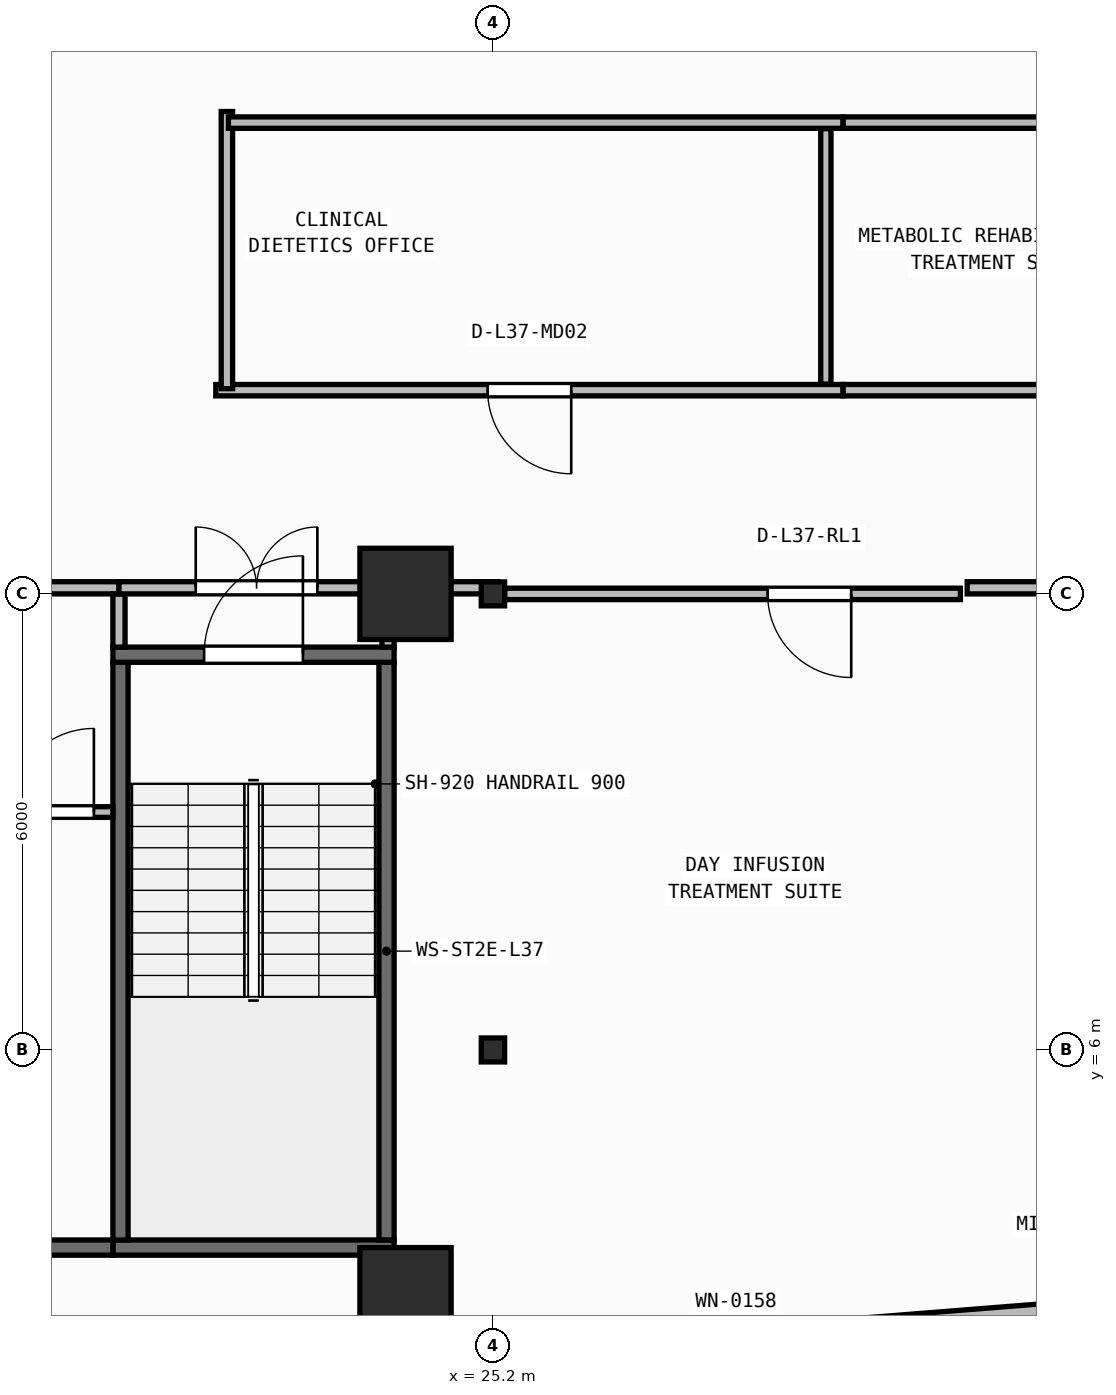
"""IFC4 building model, lengths in metres.
Left out: names, types, materials, properties, quantities, classifications, styles, units other than length and angle.
Written with IfcOpenShell. Run it as: python <this file> out.ifc"""

import sys

from ifc_helpers import new_model, si_unit, direction, frame, frame_2d, origin, origin_2d, place, context, subcontext, project, spatial, rectangle, i_section, extrude, element, fill, save


model = new_model("IFC4")
c1 = context("Model", 3, precision=1e-05, world=origin(), true_north=direction((0.0, 1.0)))
c2 = subcontext(c1, "Body", "Model", "MODEL_VIEW")
j1 = project(units=[si_unit("LENGTHUNIT", "METRE"), si_unit("PLANEANGLEUNIT", "RADIAN")], contexts=[c1])
p1 = place(None, origin())
s1 = spatial("IfcSite", under=j1, at=p1, CompositionType="ELEMENT")
p2 = place(p1, origin())
s2 = spatial("IfcBuilding", under=s1, at=p2, CompositionType="ELEMENT")
p3 = place(p2, frame((0.0, 0.0, 150.75)))
s3 = spatial("IfcBuildingStorey", under=s2, at=p3, CompositionType="ELEMENT", Elevation=150.75)
p4 = place(p3, frame((24.05, 2.8, 0.0), z_axis=(0.0, 0.0, 1.0), x_axis=(1.0, 0.0, 0.0)))
e1 = element("IfcColumn", 1, at=p4, inside=s3, PredefinedType="COLUMN", context=c2, shape_type="SweptSolid", body=[
    extrude(rectangle(XDim=1.2, YDim=1.2, at=origin_2d()), origin(), (0.0, 0.0, 1.0), 3.95),
])
p5 = place(p3, frame((25.2, 6.0, 0.0), z_axis=(0.0, 0.0, 1.0), x_axis=(1.0, 0.0, 0.0)))
e2 = element("IfcColumn", 2, at=p5, inside=s3, PredefinedType="COLUMN", context=c2, shape_type="SweptSolid", body=[
    extrude(i_section(OverallWidth=0.307, OverallDepth=0.315, WebThickness=0.012, FlangeThickness=0.019, FilletRadius=0.017, at=origin_2d()), origin(), (0.0, 0.0, 1.0), 3.95),
])
p6 = place(p3, frame((24.05, 12.0, 0.0), z_axis=(0.0, 0.0, 1.0), x_axis=(1.0, 0.0, 0.0)))
e3 = element("IfcColumn", 3, at=p6, inside=s3, PredefinedType="COLUMN", context=c2, shape_type="SweptSolid", body=[
    extrude(rectangle(XDim=1.2, YDim=1.2, at=origin_2d()), origin(), (0.0, 0.0, 1.0), 3.95),
])
p7 = place(p3, frame((25.2, 12.0, 0.0), z_axis=(0.0, 0.0, 1.0), x_axis=(1.0, 0.0, 0.0)))
e4 = element("IfcColumn", 4, at=p7, inside=s3, PredefinedType="COLUMN", context=c2, shape_type="SweptSolid", body=[
    extrude(i_section(OverallWidth=0.307, OverallDepth=0.315, WebThickness=0.012, FlangeThickness=0.019, FilletRadius=0.017, at=origin_2d()), origin(), (0.0, 0.0, 1.0), 3.95),
])
p8 = place(p3, frame((2.76, 0.173, 0.0), z_axis=(0.0, 0.0, 1.0), x_axis=(0.996857931723, 0.079210251617, 0.0)))
e5 = element("IfcWall", 5, at=p8, inside=s3, PredefinedType="STANDARD", context=c2, shape_type="SweptSolid", body=[
    extrude(rectangle(XDim=51.442, YDim=0.26, at=frame_2d((25.721, 0.0))), origin(), (0.0, 0.0, 1.0), 3.71),
])
p9 = place(p8, frame((24.521, 0.0, 0.9)))
e6 = element("IfcOpeningElement", 6, at=p9, cuts=e5, PredefinedType="OPENING", context=c2, shape_type="SweptSolid", body=[
    extrude(rectangle(XDim=2.4, YDim=1.65, at=frame_2d((1.2, 0.825))), frame((0.0, 0.14, 0.0), z_axis=(0.0, -1.0, 0.0), x_axis=(1.0, 0.0, 0.0)), (0.0, 0.0, 1.0), 0.28),
])
p10 = place(p3, frame((20.2, 3.4, 0.0), z_axis=(0.0, 0.0, 1.0), x_axis=(1.0, 0.0, 0.0)))
e7 = element("IfcWall", 7, at=p10, inside=s3, PredefinedType="SHEAR", context=c2, shape_type="SweptSolid", body=[
    extrude(rectangle(XDim=3.7, YDim=0.2, at=frame_2d((1.85, 0.0))), origin(), (0.0, 0.0, 1.0), 3.71),
])
for number, where, z_axis, x_axis in (
    (8, (20.3, 3.5, 0.0), (0.0, 0.0, 1.0), (0.0, 1.0, 0.0)),
    (9, (23.8, 3.5, 0.0), (0.0, 0.0, 1.0), (0.0, 1.0, 0.0)),
):
    element("IfcWall", number, at=place(p3, frame(where, z_axis=z_axis, x_axis=x_axis)), inside=s3, PredefinedType="SHEAR", context=c2, shape_type="SweptSolid", body=[
        extrude(rectangle(XDim=7.6, YDim=0.2, at=frame_2d((3.8, 0.0))), origin(), (0.0, 0.0, 1.0), 3.71),
    ])
p11 = place(p3, frame((20.2, 11.2, 0.0), z_axis=(0.0, 0.0, 1.0), x_axis=(1.0, 0.0, 0.0)))
e10 = element("IfcWall", 10, at=p11, inside=s3, PredefinedType="SHEAR", context=c2, shape_type="SweptSolid", body=[
    extrude(rectangle(XDim=3.7, YDim=0.2, at=frame_2d((1.85, 0.0))), origin(), (0.0, 0.0, 1.0), 3.71),
])
p12 = place(p11, frame((1.2, 0.0, 0.0)))
e11 = element("IfcOpeningElement", 11, at=p12, cuts=e10, PredefinedType="OPENING", context=c2, shape_type="SweptSolid", body=[
    extrude(rectangle(XDim=1.3, YDim=2.15, at=frame_2d((0.65, 1.075))), frame((0.0, 0.11, 0.0), z_axis=(0.0, -1.0, 0.0), x_axis=(1.0, 0.0, 0.0)), (0.0, 0.0, 1.0), 0.22),
])
p13 = place(p3, frame((6.5, 3.4, 0.0), z_axis=(0.0, 0.0, 1.0), x_axis=(1.0, 0.0, 0.0)))
e12 = element("IfcWall", 12, at=p13, inside=s3, PredefinedType="SHEAR", context=c2, shape_type="SweptSolid", body=[
    extrude(rectangle(XDim=13.7, YDim=0.2, at=frame_2d((6.85, 0.0))), origin(), (0.0, 0.0, 1.0), 3.71),
])
p14 = place(p3, frame((18.61, 9.13, 0.0), z_axis=(0.0, 0.0, 1.0), x_axis=(1.0, 0.0, 0.0)))
e13 = element("IfcWall", 13, at=p14, inside=s3, PredefinedType="PARTITIONING", context=c2, shape_type="SweptSolid", body=[
    extrude(rectangle(XDim=1.59, YDim=0.14, at=frame_2d((0.795, 0.0))), origin(), (0.0, 0.0, 1.0), 3.71),
])
p15 = place(p14, frame((0.24, 0.0, 0.0)))
e14 = element("IfcOpeningElement", 14, at=p15, cuts=e13, PredefinedType="OPENING", context=c2, shape_type="SweptSolid", body=[
    extrude(rectangle(XDim=1.1, YDim=2.1, at=frame_2d((0.55, 1.05))), frame((0.0, 0.08, 0.0), z_axis=(0.0, -1.0, 0.0), x_axis=(1.0, 0.0, 0.0)), (0.0, 0.0, 1.0), 0.16),
])
p16 = place(p3, frame((12.58, 12.08, 0.0), z_axis=(0.0, 0.0, 1.0), x_axis=(1.0, 0.0, 0.0)))
e15 = element("IfcWall", 15, at=p16, inside=s3, PredefinedType="PARTITIONING", context=c2, shape_type="SweptSolid", body=[
    extrude(rectangle(XDim=7.7, YDim=0.16, at=frame_2d((3.85, 0.0))), origin(), (0.0, 0.0, 1.0), 3.083),
])
p17 = place(p16, frame((3.05, 0.0, 0.0)))
e16 = element("IfcOpeningElement", 16, at=p17, cuts=e15, PredefinedType="OPENING", context=c2, shape_type="SweptSolid", body=[
    extrude(rectangle(XDim=1.6, YDim=2.05, at=frame_2d((0.8, 1.025))), frame((0.0, 0.09, 0.0), z_axis=(0.0, -1.0, 0.0), x_axis=(1.0, 0.0, 0.0)), (0.0, 0.0, 1.0), 0.18),
])
p18 = place(p3, frame((20.28, 11.3, 0.0), z_axis=(0.0, 0.0, 1.0), x_axis=(0.0, 1.0, 0.0)))
e17 = element("IfcWall", 17, at=p18, inside=s3, PredefinedType="PARTITIONING", context=c2, shape_type="SweptSolid", body=[
    extrude(rectangle(XDim=0.7, YDim=0.16, at=frame_2d((0.35, 0.0))), origin(), (0.0, 0.0, 1.0), 3.71),
])
p19 = place(p3, frame((20.28, 12.08, 0.0), z_axis=(0.0, 0.0, 1.0), x_axis=(1.0, 0.0, 0.0)))
e18 = element("IfcWall", 18, at=p19, inside=s3, PredefinedType="PARTITIONING", context=c2, shape_type="SweptSolid", body=[
    extrude(rectangle(XDim=3.62, YDim=0.16, at=frame_2d((1.81, 0.0))), origin(), (0.0, 0.0, 1.0), 3.083),
])
p20 = place(p19, frame((1.01, 0.0, 0.0)))
e19 = element("IfcOpeningElement", 19, at=p20, cuts=e18, PredefinedType="OPENING", context=c2, shape_type="SweptSolid", body=[
    extrude(rectangle(XDim=1.6, YDim=2.05, at=frame_2d((0.8, 1.025))), frame((0.0, 0.09, 0.0), z_axis=(0.0, -1.0, 0.0), x_axis=(1.0, 0.0, 0.0)), (0.0, 0.0, 1.0), 0.18),
])
p21 = place(p3, frame((23.82, 11.3, 0.0), z_axis=(0.0, 0.0, 1.0), x_axis=(0.0, 1.0, 0.0)))
e20 = element("IfcWall", 20, at=p21, inside=s3, PredefinedType="PARTITIONING", context=c2, shape_type="SweptSolid", body=[
    extrude(rectangle(XDim=0.7, YDim=0.16, at=frame_2d((0.35, 0.0))), origin(), (0.0, 0.0, 1.0), 3.71),
])
p22 = place(p3, frame((31.35, 12.0, 0.0), z_axis=(0.0, 0.0, 1.0), x_axis=(-1.0, 0.0, 0.0)))
e21 = element("IfcWall", 21, at=p22, inside=s3, PredefinedType="PARTITIONING", context=c2, shape_type="SweptSolid", body=[
    extrude(rectangle(XDim=5.997, YDim=0.15, at=frame_2d((2.998, 0.0))), origin(), (0.0, 0.0, 1.0), 3.083),
])
p23 = place(p22, frame((1.437, 0.0, 0.0)))
e22 = element("IfcOpeningElement", 22, at=p23, cuts=e21, PredefinedType="OPENING", context=c2, shape_type="SweptSolid", body=[
    extrude(rectangle(XDim=1.1, YDim=2.1, at=frame_2d((0.55, 1.05))), frame((0.0, 0.085, 0.0), z_axis=(0.0, -1.0, 0.0), x_axis=(1.0, 0.0, 0.0)), (0.0, 0.0, 1.0), 0.17),
])
p24 = place(p3, frame((29.806, 14.68, 0.0), z_axis=(0.0, 0.0, 1.0), x_axis=(-1.0, 0.0, 0.0)))
e23 = element("IfcWall", 23, at=p24, inside=s3, PredefinedType="PARTITIONING", context=c2, shape_type="SweptSolid", body=[
    extrude(rectangle(XDim=8.252, YDim=0.15, at=frame_2d((4.126, 0.0))), origin(), (0.0, 0.0, 1.0), 3.71),
])
p25 = place(p24, frame((3.576, 0.0, 0.0)))
e24 = element("IfcOpeningElement", 24, at=p25, cuts=e23, PredefinedType="OPENING", context=c2, shape_type="SweptSolid", body=[
    extrude(rectangle(XDim=1.1, YDim=2.1, at=frame_2d((0.55, 1.05))), frame((0.0, 0.085, 0.0), z_axis=(0.0, -1.0, 0.0), x_axis=(1.0, 0.0, 0.0)), (0.0, 0.0, 1.0), 0.17),
])
p26 = place(p3, frame((39.336, 14.68, 0.0), z_axis=(0.0, 0.0, 1.0), x_axis=(-1.0, 0.0, 0.0)))
e25 = element("IfcWall", 25, at=p26, inside=s3, PredefinedType="PARTITIONING", context=c2, shape_type="SweptSolid", body=[
    extrude(rectangle(XDim=9.528, YDim=0.15, at=frame_2d((4.764, 0.0))), origin(), (0.0, 0.0, 1.0), 3.71),
])
p27 = place(p26, frame((4.214, 0.0, 0.0)))
e26 = element("IfcOpeningElement", 26, at=p27, cuts=e25, PredefinedType="OPENING", context=c2, shape_type="SweptSolid", body=[
    extrude(rectangle(XDim=1.1, YDim=2.1, at=frame_2d((0.55, 1.05))), frame((0.0, 0.085, 0.0), z_axis=(0.0, -1.0, 0.0), x_axis=(1.0, 0.0, 0.0)), (0.0, 0.0, 1.0), 0.17),
])
p28 = place(p3, frame((21.7, 14.7, 0.0), z_axis=(0.0, 0.0, 1.0), x_axis=(0.0, 1.0, 0.0)))
e27 = element("IfcWall", 27, at=p28, inside=s3, PredefinedType="PARTITIONING", context=c2, shape_type="SweptSolid", body=[
    extrude(rectangle(XDim=3.646, YDim=0.15, at=frame_2d((1.823, 0.0))), origin(), (0.0, 0.0, 1.0), 3.71),
])
p29 = place(p3, frame((21.72, 18.2, 0.0), z_axis=(0.0, 0.0, 1.0), x_axis=(1.0, 0.0, 0.0)))
e28 = element("IfcWall", 28, at=p29, inside=s3, PredefinedType="PARTITIONING", context=c2, shape_type="SweptSolid", body=[
    extrude(rectangle(XDim=8.086, YDim=0.15, at=frame_2d((4.043, 0.0))), origin(), (0.0, 0.0, 1.0), 3.71),
])
p30 = place(p3, frame((29.808, 18.2, 0.0), z_axis=(0.0, 0.0, 1.0), x_axis=(1.0, 0.0, 0.0)))
e29 = element("IfcWall", 29, at=p30, inside=s3, PredefinedType="PARTITIONING", context=c2, shape_type="SweptSolid", body=[
    extrude(rectangle(XDim=9.528, YDim=0.15, at=frame_2d((4.764, 0.0))), origin(), (0.0, 0.0, 1.0), 3.71),
])
p31 = place(p3, frame((29.58, 14.76, 0.0), z_axis=(0.0, 0.0, 1.0), x_axis=(0.0, 1.0, 0.0)))
e30 = element("IfcWall", 30, at=p31, inside=s3, PredefinedType="PARTITIONING", context=c2, shape_type="SweptSolid", body=[
    extrude(rectangle(XDim=3.36, YDim=0.135, at=frame_2d((1.68, 0.0))), origin(), (0.0, 0.0, 1.0), 3.71),
])
p32 = place(p3, frame((24.02, 12.08, 0.0), z_axis=(0.0, 0.0, 1.0), x_axis=(1.0, 0.0, 0.0)))
e31 = element("IfcWall", 31, at=p32, inside=s3, PredefinedType="PARTITIONING", context=c2, shape_type="SweptSolid", body=[
    extrude(rectangle(XDim=1.244, YDim=0.16, at=frame_2d((0.622, 0.0))), origin(), (0.0, 0.0, 1.0), 3.083),
])
p33 = place(p3, frame((31.439, 12.08, 0.0), z_axis=(0.0, 0.0, 1.0), x_axis=(1.0, 0.0, 0.0)))
e32 = element("IfcWall", 32, at=p33, inside=s3, PredefinedType="PARTITIONING", context=c2, shape_type="SweptSolid", body=[
    extrude(rectangle(XDim=2.631, YDim=0.16, at=frame_2d((1.315, 0.0))), origin(), (0.0, 0.0, 1.0), 3.083),
])
p34 = place(p12, origin())
e33 = element("IfcDoor", 33, at=p34, inside=s3, OperationType="SINGLE_SWING_RIGHT", PredefinedType="DOOR", context=c2, shape_type="SweptSolid", body=[
    extrude(rectangle(XDim=1.3, YDim=2.15, at=frame_2d((0.65, 1.075))), frame((0.0, 0.025, 0.0), z_axis=(0.0, -1.0, 0.0), x_axis=(1.0, 0.0, 0.0)), (0.0, 0.0, 1.0), 0.05),
])
fill(e11, e33)
p35 = place(p15, origin())
e34 = element("IfcDoor", 34, at=p35, inside=s3, OperationType="SINGLE_SWING_RIGHT", PredefinedType="DOOR", context=c2, shape_type="SweptSolid", body=[
    extrude(rectangle(XDim=1.1, YDim=2.1, at=frame_2d((0.55, 1.05))), frame((0.0, 0.025, 0.0), z_axis=(0.0, -1.0, 0.0), x_axis=(1.0, 0.0, 0.0)), (0.0, 0.0, 1.0), 0.05),
])
fill(e14, e34)
p36 = place(p20, origin())
e35 = element("IfcDoor", 35, at=p36, inside=s3, OperationType="DOUBLE_DOOR_SINGLE_SWING", PredefinedType="DOOR", context=c2, shape_type="SweptSolid", body=[
    extrude(rectangle(XDim=1.6, YDim=2.05, at=frame_2d((0.8, 1.025))), frame((0.0, 0.025, 0.0), z_axis=(0.0, -1.0, 0.0), x_axis=(1.0, 0.0, 0.0)), (0.0, 0.0, 1.0), 0.05),
])
fill(e19, e35)
p37 = place(p23, origin())
e36 = element("IfcDoor", 36, at=p37, inside=s3, OperationType="SINGLE_SWING_LEFT", PredefinedType="DOOR", context=c2, shape_type="SweptSolid", body=[
    extrude(rectangle(XDim=1.1, YDim=2.1, at=frame_2d((0.55, 1.05))), frame((0.0, 0.025, 0.0), z_axis=(0.0, -1.0, 0.0), x_axis=(1.0, 0.0, 0.0)), (0.0, 0.0, 1.0), 0.05),
])
fill(e22, e36)
p38 = place(p25, origin())
e37 = element("IfcDoor", 37, at=p38, inside=s3, OperationType="SINGLE_SWING_LEFT", PredefinedType="DOOR", context=c2, shape_type="SweptSolid", body=[
    extrude(rectangle(XDim=1.1, YDim=2.1, at=frame_2d((0.55, 1.05))), frame((0.0, 0.025, 0.0), z_axis=(0.0, -1.0, 0.0), x_axis=(1.0, 0.0, 0.0)), (0.0, 0.0, 1.0), 0.05),
])
fill(e24, e37)
save(model, sys.argv[1])
